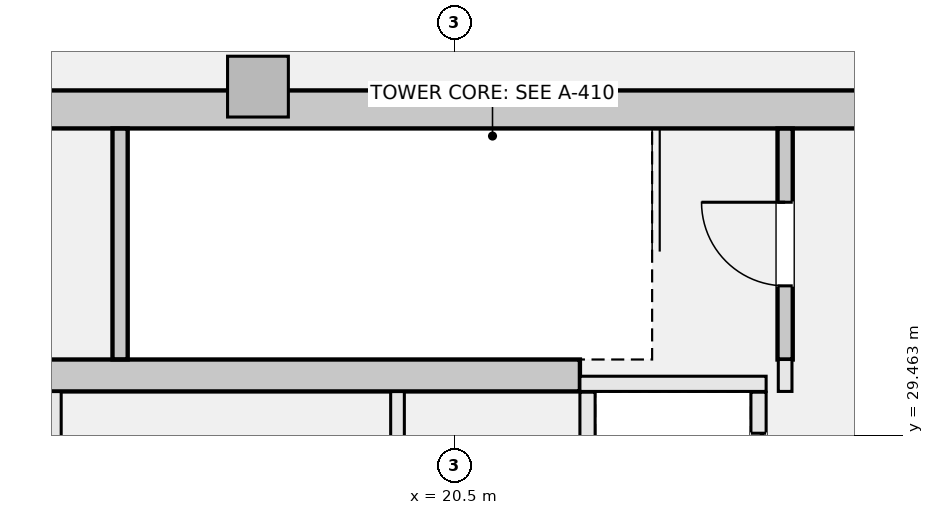
"""IFC4 building model, lengths in metres.
Left out: names, types, materials, properties, quantities, classifications, styles, units other than length and angle.
Written with IfcOpenShell. Run it as: python <this file> out.ifc"""

import sys

from ifc_helpers import new_model, si_unit, direction, frame, frame_2d, origin, origin_2d, place, context, subcontext, project, spatial, rectangle, extrude, element, fill, save


model = new_model("IFC4")
c1 = context("Model", 3, precision=1e-05, world=origin(), true_north=direction((0.0, 1.0)))
c2 = subcontext(c1, "Body", "Model", "MODEL_VIEW")
j1 = project(units=[si_unit("LENGTHUNIT", "METRE"), si_unit("PLANEANGLEUNIT", "RADIAN")], contexts=[c1])
p1 = place(None, origin())
s1 = spatial("IfcSite", under=j1, at=p1, CompositionType="ELEMENT")
p2 = place(p1, origin())
s2 = spatial("IfcBuilding", under=s1, at=p2, CompositionType="ELEMENT")
p3 = place(p2, frame((0.0, 0.0, 281.6)))
s3 = spatial("IfcBuildingStorey", under=s2, at=p3, CompositionType="ELEMENT", Elevation=281.6)
p4 = place(p3, frame((14.25, 33.75, -0.28), z_axis=(0.0, 0.0, 1.0), x_axis=(1.0, 0.0, 0.0)))
e1 = element("IfcWall", 1, at=p4, inside=s3, PredefinedType="SHEAR", context=c2, shape_type="SweptSolid", body=[
    extrude(rectangle(XDim=13.5, YDim=0.5, at=frame_2d((6.75, 0.0))), origin(), (0.0, 0.0, 1.0), 5.78),
])
p5 = place(p3, frame((14.85, 30.25, -0.28), z_axis=(0.0, 0.0, 1.0), x_axis=(1.0, 0.0, 0.0)))
e2 = element("IfcWall", 2, at=p5, inside=s3, PredefinedType="SHEAR", context=c2, shape_type="SweptSolid", body=[
    extrude(rectangle(XDim=7.3, YDim=0.42, at=frame_2d((3.65, 0.0))), origin(), (0.0, 0.0, 1.0), 5.78),
])
p6 = place(p3, frame((17.914, 34.05, -0.28), z_axis=(0.0, 0.0, 1.0), x_axis=(1.0, 0.0, 0.0)))
e3 = element("IfcColumn", 3, at=p6, inside=s3, PredefinedType="PILASTER", context=c2, shape_type="SweptSolid", body=[
    extrude(rectangle(XDim=0.8, YDim=0.8, at=origin_2d()), origin(), (0.0, 0.0, 1.0), 5.78),
])
p7 = place(p3, frame((24.85, 30.46, -0.28), z_axis=(0.0, 0.0, 1.0), x_axis=(0.0, 1.0, 0.0)))
e4 = element("IfcWall", 4, at=p7, inside=s3, PredefinedType="SHEAR", context=c2, shape_type="SweptSolid", body=[
    extrude(rectangle(XDim=3.038, YDim=0.2, at=frame_2d((1.519, 0.0))), origin(), (0.0, 0.0, 1.0), 5.78),
])
p8 = place(p7, frame((0.969, 0.0, 0.28)))
e5 = element("IfcOpeningElement", 5, at=p8, cuts=e4, PredefinedType="OPENING", context=c2, shape_type="SweptSolid", body=[
    extrude(rectangle(XDim=1.1, YDim=2.15, at=frame_2d((0.55, 1.075))), frame((0.0, 0.11, 0.0), z_axis=(0.0, -1.0, 0.0), x_axis=(1.0, 0.0, 0.0)), (0.0, 0.0, 1.0), 0.22),
])
p9 = place(p3, frame((16.1, 30.462, -0.28), z_axis=(0.0, 0.0, 1.0), x_axis=(0.0, 1.0, 0.0)))
e6 = element("IfcWall", 6, at=p9, inside=s3, PredefinedType="SHEAR", context=c2, shape_type="SweptSolid", body=[
    extrude(rectangle(XDim=3.036, YDim=0.2, at=frame_2d((1.518, 0.0))), origin(), (0.0, 0.0, 1.0), 5.78),
])
p10 = place(p3, frame((22.15, 30.14, 0.0), z_axis=(0.0, 0.0, 1.0), x_axis=(1.0, 0.0, 0.0)))
e7 = element("IfcWall", 7, at=p10, inside=s3, PredefinedType="SOLIDWALL", context=c2, shape_type="SweptSolid", body=[
    extrude(rectangle(XDim=2.45, YDim=0.2, at=frame_2d((1.225, 0.0))), origin(), (0.0, 0.0, 1.0), 5.5),
])
p11 = place(p3, frame((22.25, 27.85, 0.0), z_axis=(0.0, 0.0, 1.0), x_axis=(0.0, 1.0, 0.0)))
e8 = element("IfcWall", 8, at=p11, inside=s3, PredefinedType="SOLIDWALL", context=c2, shape_type="SweptSolid", body=[
    extrude(rectangle(XDim=2.18, YDim=0.2, at=frame_2d((1.09, 0.0))), origin(), (0.0, 0.0, 1.0), 5.5),
])
p12 = place(p3, frame((24.5, 27.85, 0.0), z_axis=(0.0, 0.0, 1.0), x_axis=(0.0, 1.0, 0.0)))
e9 = element("IfcWall", 9, at=p12, inside=s3, PredefinedType="SOLIDWALL", context=c2, shape_type="SweptSolid", body=[
    extrude(rectangle(XDim=2.18, YDim=0.2, at=frame_2d((1.09, 0.0))), origin(), (0.0, 0.0, 1.0), 5.5),
])
p13 = place(p12, frame((0.54, 0.0, 0.0)))
e10 = element("IfcOpeningElement", 10, at=p13, cuts=e9, PredefinedType="OPENING", context=c2, shape_type="SweptSolid", body=[
    extrude(rectangle(XDim=1.1, YDim=2.2, at=frame_2d((0.55, 1.1))), frame((0.0, 0.11, 0.0), z_axis=(0.0, -1.0, 0.0), x_axis=(1.0, 0.0, 0.0)), (0.0, 0.0, 1.0), 0.22),
])
p14 = place(p3, frame((24.85, 30.04, 0.0), z_axis=(0.0, 0.0, 1.0), x_axis=(0.0, 1.0, 0.0)))
e11 = element("IfcWall", 11, at=p14, inside=s3, PredefinedType="SOLIDWALL", context=c2, shape_type="SweptSolid", body=[
    extrude(rectangle(XDim=0.42, YDim=0.18, at=frame_2d((0.21, 0.0))), origin(), (0.0, 0.0, 1.0), 5.5),
])
p15 = place(p3, frame((15.25, 27.932, 0.0), z_axis=(0.0, 0.0, 1.0), x_axis=(0.0, 1.0, 0.0)))
e12 = element("IfcWall", 12, at=p15, inside=s3, PredefinedType="PARTITIONING", context=c2, shape_type="SweptSolid", body=[
    extrude(rectangle(XDim=2.106, YDim=0.15, at=frame_2d((1.053, 0.0))), origin(), (0.0, 0.0, 1.0), 5.5),
])
p16 = place(p3, frame((19.75, 27.932, 0.0), z_axis=(0.0, 0.0, 1.0), x_axis=(0.0, 1.0, 0.0)))
e13 = element("IfcWall", 13, at=p16, inside=s3, PredefinedType="SOLIDWALL", context=c2, shape_type="SweptSolid", body=[
    extrude(rectangle(XDim=2.106, YDim=0.18, at=frame_2d((1.053, 0.0))), origin(), (0.0, 0.0, 1.0), 5.5),
])
p17 = place(p8, origin())
e14 = element("IfcDoor", 14, at=p17, inside=s3, OperationType="SINGLE_SWING_RIGHT", PredefinedType="DOOR", context=c2, shape_type="SweptSolid", body=[
    extrude(rectangle(XDim=1.1, YDim=2.15, at=frame_2d((0.55, 1.075))), frame((0.0, 0.025, 0.0), z_axis=(0.0, -1.0, 0.0), x_axis=(1.0, 0.0, 0.0)), (0.0, 0.0, 1.0), 0.05),
])
fill(e5, e14)
p18 = place(p13, origin())
e15 = element("IfcDoor", 15, at=p18, inside=s3, OperationType="SLIDING_TO_LEFT", PredefinedType="DOOR", context=c2, shape_type="SweptSolid", body=[
    extrude(rectangle(XDim=1.1, YDim=2.2, at=frame_2d((0.55, 1.1))), frame((0.0, 0.025, 0.0), z_axis=(0.0, -1.0, 0.0), x_axis=(1.0, 0.0, 0.0)), (0.0, 0.0, 1.0), 0.05),
])
fill(e10, e15)
save(model, sys.argv[1])
